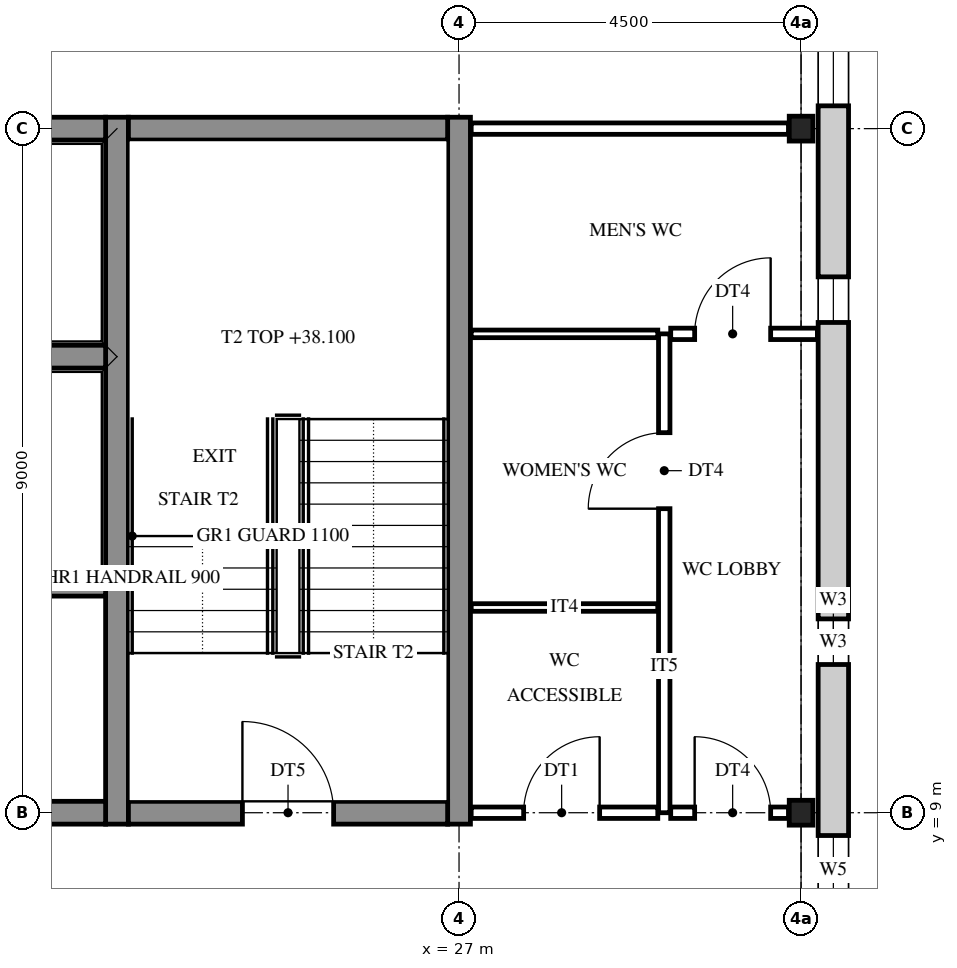
"""IFC4 building model, lengths in metres.
Left out: names, types, materials, properties, quantities, classifications, styles, units other than length and angle.
Written with IfcOpenShell. Run it as: python <this file> out.ifc"""

import sys

from ifc_helpers import new_model, si_unit, direction, frame, frame_2d, origin, origin_2d, place, context, subcontext, project, spatial, rectangle, i_section, extrude, element, fill, save


model = new_model("IFC4")
c1 = context("Model", 3, precision=1e-05, world=origin(), true_north=direction((0.0, 1.0)))
c2 = subcontext(c1, "Body", "Model", "MODEL_VIEW")
j1 = project(units=[si_unit("LENGTHUNIT", "METRE"), si_unit("PLANEANGLEUNIT", "RADIAN")], contexts=[c1])
p1 = place(None, origin())
s1 = spatial("IfcSite", under=j1, at=p1, CompositionType="ELEMENT")
p2 = place(p1, origin())
s2 = spatial("IfcBuilding", under=s1, at=p2, CompositionType="ELEMENT")
p3 = place(p2, frame((0.0, 0.0, 36.0)))
s3 = spatial("IfcBuildingStorey", under=s2, at=p3, CompositionType="ELEMENT", Elevation=36.0)
for number, where, z_axis, x_axis in (
    (1, (31.5, 9.0, 0.0), (0.0, 0.0, 1.0), (1.0, 0.0, 0.0)),
    (2, (31.5, 18.0, 0.0), (0.0, 0.0, 1.0), (1.0, 0.0, 0.0)),
):
    element("IfcColumn", number, at=place(p3, frame(where, z_axis=z_axis, x_axis=x_axis)), inside=s3, PredefinedType="COLUMN", context=c2, shape_type="SweptSolid", body=[
        extrude(i_section(OverallWidth=0.311, OverallDepth=0.327, WebThickness=0.016, FlangeThickness=0.025, FilletRadius=0.017, at=origin_2d()), origin(), (0.0, 0.0, 1.0), 4.2),
    ])
for number, where, z_axis, x_axis in (
    (3, (22.5, 8.85, 0.0), (0.0, 0.0, 1.0), (0.0, 1.0, 0.0)),
    (4, (27.0, 8.85, 0.0), (0.0, 0.0, 1.0), (0.0, 1.0, 0.0)),
):
    element("IfcWall", number, at=place(p3, frame(where, z_axis=z_axis, x_axis=x_axis)), inside=s3, PredefinedType="SHEAR", context=c2, shape_type="SweptSolid", body=[
        extrude(rectangle(XDim=9.3, YDim=0.3, at=frame_2d((4.65, 0.0))), origin(), (0.0, 0.0, 1.0), 4.2),
    ])
p4 = place(p3, frame((19.65, 9.0, 0.0), z_axis=(0.0, 0.0, 1.0), x_axis=(1.0, 0.0, 0.0)))
e5 = element("IfcWall", 5, at=p4, inside=s3, PredefinedType="SHEAR", context=c2, shape_type="SweptSolid", body=[
    extrude(rectangle(XDim=2.7, YDim=0.3, at=frame_2d((1.35, 0.0))), origin(), (0.0, 0.0, 1.0), 4.2),
])
p5 = place(p3, frame((22.65, 9.0, 0.0), z_axis=(0.0, 0.0, 1.0), x_axis=(1.0, 0.0, 0.0)))
e6 = element("IfcWall", 6, at=p5, inside=s3, PredefinedType="SHEAR", context=c2, shape_type="SweptSolid", body=[
    extrude(rectangle(XDim=4.2, YDim=0.3, at=frame_2d((2.1, 0.0))), origin(), (0.0, 0.0, 1.0), 4.2),
])
p6 = place(p5, frame((1.5, 0.0, 0.0)))
e7 = element("IfcOpeningElement", 7, at=p6, cuts=e6, PredefinedType="OPENING", context=c2, shape_type="SweptSolid", body=[
    extrude(rectangle(XDim=1.2, YDim=2.1, at=frame_2d((0.6, 1.05))), frame((0.0, 0.16, 0.0), z_axis=(0.0, -1.0, 0.0), x_axis=(1.0, 0.0, 0.0)), (0.0, 0.0, 1.0), 0.32),
])
for number, where, z_axis, x_axis in (
    (8, (19.65, 12.0, 0.0), (0.0, 0.0, 1.0), (1.0, 0.0, 0.0)),
    (9, (19.65, 15.0, 0.0), (0.0, 0.0, 1.0), (1.0, 0.0, 0.0)),
    (10, (19.65, 18.0, 0.0), (0.0, 0.0, 1.0), (1.0, 0.0, 0.0)),
):
    element("IfcWall", number, at=place(p3, frame(where, z_axis=z_axis, x_axis=x_axis)), inside=s3, PredefinedType="SHEAR", context=c2, shape_type="SweptSolid", body=[
        extrude(rectangle(XDim=2.7, YDim=0.3, at=frame_2d((1.35, 0.0))), origin(), (0.0, 0.0, 1.0), 4.2),
    ])
p7 = place(p3, frame((22.65, 18.0, 0.0), z_axis=(0.0, 0.0, 1.0), x_axis=(1.0, 0.0, 0.0)))
e11 = element("IfcWall", 11, at=p7, inside=s3, PredefinedType="SHEAR", context=c2, shape_type="SweptSolid", body=[
    extrude(rectangle(XDim=4.2, YDim=0.3, at=frame_2d((2.1, 0.0))), origin(), (0.0, 0.0, 1.0), 4.2),
])
p8 = place(p3, frame((31.925, 27.225, 0.0), z_axis=(0.0, 0.0, 1.0), x_axis=(0.0, -1.0, 0.0)))
e12 = element("IfcWall", 12, at=p8, inside=s3, PredefinedType="STANDARD", context=c2, shape_type="SweptSolid", body=[
    extrude(rectangle(XDim=27.45, YDim=0.4, at=frame_2d((13.725, 0.0))), origin(), (0.0, 0.0, 1.0), 4.2),
])
p9 = place(p8, frame((26.025, 0.0, 0.9)))
e13 = element("IfcOpeningElement", 13, at=p9, cuts=e12, PredefinedType="OPENING", context=c2, shape_type="SweptSolid", body=[
    extrude(rectangle(XDim=0.9, YDim=2.0, at=frame_2d((0.45, 1.0))), frame((0.0, 0.21, 0.0), z_axis=(0.0, -1.0, 0.0), x_axis=(1.0, 0.0, 0.0)), (0.0, 0.0, 1.0), 0.42),
])
p10 = place(p8, frame((18.525, 0.0, 0.9)))
e14 = element("IfcOpeningElement", 14, at=p10, cuts=e12, PredefinedType="OPENING", context=c2, shape_type="SweptSolid", body=[
    extrude(rectangle(XDim=0.9, YDim=2.0, at=frame_2d((0.45, 1.0))), frame((0.0, 0.21, 0.0), z_axis=(0.0, -1.0, 0.0), x_axis=(1.0, 0.0, 0.0)), (0.0, 0.0, 1.0), 0.42),
])
p11 = place(p8, frame((15.675, 0.0, 1.6)))
e15 = element("IfcOpeningElement", 15, at=p11, cuts=e12, PredefinedType="OPENING", context=c2, shape_type="SweptSolid", body=[
    extrude(rectangle(XDim=0.6, YDim=0.9, at=frame_2d((0.3, 0.45))), frame((0.0, 0.21, 0.0), z_axis=(0.0, -1.0, 0.0), x_axis=(1.0, 0.0, 0.0)), (0.0, 0.0, 1.0), 0.42),
])
p12 = place(p8, frame((11.175, 0.0, 1.6)))
e16 = element("IfcOpeningElement", 16, at=p12, cuts=e12, PredefinedType="OPENING", context=c2, shape_type="SweptSolid", body=[
    extrude(rectangle(XDim=0.6, YDim=0.9, at=frame_2d((0.3, 0.45))), frame((0.0, 0.21, 0.0), z_axis=(0.0, -1.0, 0.0), x_axis=(1.0, 0.0, 0.0)), (0.0, 0.0, 1.0), 0.42),
])
p13 = place(p8, frame((8.025, 0.0, 0.9)))
e17 = element("IfcOpeningElement", 17, at=p13, cuts=e12, PredefinedType="OPENING", context=c2, shape_type="SweptSolid", body=[
    extrude(rectangle(XDim=0.9, YDim=2.0, at=frame_2d((0.45, 1.0))), frame((0.0, 0.21, 0.0), z_axis=(0.0, -1.0, 0.0), x_axis=(1.0, 0.0, 0.0)), (0.0, 0.0, 1.0), 0.42),
])
p14 = place(p8, frame((0.525, 0.0, 0.9)))
e18 = element("IfcOpeningElement", 18, at=p14, cuts=e12, PredefinedType="OPENING", context=c2, shape_type="SweptSolid", body=[
    extrude(rectangle(XDim=0.9, YDim=2.0, at=frame_2d((0.45, 1.0))), frame((0.0, 0.21, 0.0), z_axis=(0.0, -1.0, 0.0), x_axis=(1.0, 0.0, 0.0)), (0.0, 0.0, 1.0), 0.42),
])
p15 = place(p3, frame((29.7, 9.0, 0.0), z_axis=(0.0, 0.0, 1.0), x_axis=(0.0, 1.0, 0.0)))
e19 = element("IfcWall", 19, at=p15, inside=s3, PredefinedType="PARTITIONING", context=c2, shape_type="SweptSolid", body=[
    extrude(rectangle(XDim=6.3, YDim=0.15, at=frame_2d((3.15, 0.0))), origin(), (0.0, 0.0, 1.0), 3.537),
])
p16 = place(p15, frame((4.0, 0.0, 0.0)))
e20 = element("IfcOpeningElement", 20, at=p16, cuts=e19, PredefinedType="OPENING", context=c2, shape_type="SweptSolid", body=[
    extrude(rectangle(XDim=1.0, YDim=2.1, at=frame_2d((0.5, 1.05))), frame((0.0, 0.085, 0.0), z_axis=(0.0, -1.0, 0.0), x_axis=(1.0, 0.0, 0.0)), (0.0, 0.0, 1.0), 0.17),
])
p17 = place(p3, frame((27.16, 9.0, 0.0), z_axis=(0.0, 0.0, 1.0), x_axis=(1.0, 0.0, 0.0)))
e21 = element("IfcWall", 21, at=p17, inside=s3, PredefinedType="PARTITIONING", context=c2, shape_type="SweptSolid", body=[
    extrude(rectangle(XDim=2.455, YDim=0.15, at=frame_2d((1.228, 0.0))), origin(), (0.0, 0.0, 1.0), 3.537),
])
p18 = place(p17, frame((0.69, 0.0, 0.0)))
e22 = element("IfcOpeningElement", 22, at=p18, cuts=e21, PredefinedType="OPENING", context=c2, shape_type="SweptSolid", body=[
    extrude(rectangle(XDim=1.0, YDim=2.1, at=frame_2d((0.5, 1.05))), frame((0.0, 0.085, 0.0), z_axis=(0.0, -1.0, 0.0), x_axis=(1.0, 0.0, 0.0)), (0.0, 0.0, 1.0), 0.17),
])
p19 = place(p3, frame((29.785, 9.0, 0.0), z_axis=(0.0, 0.0, 1.0), x_axis=(1.0, 0.0, 0.0)))
e23 = element("IfcWall", 23, at=p19, inside=s3, PredefinedType="PARTITIONING", context=c2, shape_type="SweptSolid", body=[
    extrude(rectangle(XDim=1.55, YDim=0.15, at=frame_2d((0.775, 0.0))), origin(), (0.0, 0.0, 1.0), 3.537),
])
p20 = place(p19, frame((0.315, 0.0, 0.0)))
e24 = element("IfcOpeningElement", 24, at=p20, cuts=e23, PredefinedType="OPENING", context=c2, shape_type="SweptSolid", body=[
    extrude(rectangle(XDim=1.0, YDim=2.1, at=frame_2d((0.5, 1.05))), frame((0.0, 0.085, 0.0), z_axis=(0.0, -1.0, 0.0), x_axis=(1.0, 0.0, 0.0)), (0.0, 0.0, 1.0), 0.17),
])
for number, where, z_axis, x_axis in (
    (25, (27.16, 11.7, 0.0), (0.0, 0.0, 1.0), (1.0, 0.0, 0.0)),
    (26, (27.16, 15.3, 0.0), (0.0, 0.0, 1.0), (1.0, 0.0, 0.0)),
):
    element("IfcWall", number, at=place(p3, frame(where, z_axis=z_axis, x_axis=x_axis)), inside=s3, PredefinedType="PARTITIONING", context=c2, shape_type="SweptSolid", body=[
        extrude(rectangle(XDim=2.455, YDim=0.1, at=frame_2d((1.228, 0.0))), origin(), (0.0, 0.0, 1.0), 3.537),
    ])
p21 = place(p3, frame((29.785, 15.3, 0.0), z_axis=(0.0, 0.0, 1.0), x_axis=(1.0, 0.0, 0.0)))
e27 = element("IfcWall", 27, at=p21, inside=s3, PredefinedType="PARTITIONING", context=c2, shape_type="SweptSolid", body=[
    extrude(rectangle(XDim=1.93, YDim=0.15, at=frame_2d((0.965, 0.0))), origin(), (0.0, 0.0, 1.0), 3.537),
])
p22 = place(p21, frame((0.315, 0.0, 0.0)))
e28 = element("IfcOpeningElement", 28, at=p22, cuts=e27, PredefinedType="OPENING", context=c2, shape_type="SweptSolid", body=[
    extrude(rectangle(XDim=1.0, YDim=2.1, at=frame_2d((0.5, 1.05))), frame((0.0, 0.085, 0.0), z_axis=(0.0, -1.0, 0.0), x_axis=(1.0, 0.0, 0.0)), (0.0, 0.0, 1.0), 0.17),
])
p23 = place(p3, frame((27.16, 18.0, 0.0), z_axis=(0.0, 0.0, 1.0), x_axis=(1.0, 0.0, 0.0)))
e29 = element("IfcWall", 29, at=p23, inside=s3, PredefinedType="PARTITIONING", context=c2, shape_type="SweptSolid", body=[
    extrude(rectangle(XDim=4.175, YDim=0.15, at=frame_2d((2.087, 0.0))), origin(), (0.0, 0.0, 1.0), 3.537),
])
p24 = place(p10, origin())
e30 = element("IfcWindow", 30, at=p24, inside=s3, PartitioningType="SINGLE_PANEL", PredefinedType="WINDOW", context=c2, shape_type="SweptSolid", body=[
    extrude(rectangle(XDim=0.9, YDim=2.0, at=frame_2d((0.45, 1.0))), frame((0.0, 0.03, 0.0), z_axis=(0.0, -1.0, 0.0), x_axis=(1.0, 0.0, 0.0)), (0.0, 0.0, 1.0), 0.06),
])
fill(e14, e30)
p25 = place(p11, origin())
e31 = element("IfcWindow", 31, at=p25, inside=s3, PartitioningType="SINGLE_PANEL", PredefinedType="WINDOW", context=c2, shape_type="SweptSolid", body=[
    extrude(rectangle(XDim=0.6, YDim=0.9, at=frame_2d((0.3, 0.45))), frame((0.0, 0.03, 0.0), z_axis=(0.0, -1.0, 0.0), x_axis=(1.0, 0.0, 0.0)), (0.0, 0.0, 1.0), 0.06),
])
fill(e15, e31)
p26 = place(p12, origin())
e32 = element("IfcWindow", 32, at=p26, inside=s3, PartitioningType="SINGLE_PANEL", PredefinedType="WINDOW", context=c2, shape_type="SweptSolid", body=[
    extrude(rectangle(XDim=0.6, YDim=0.9, at=frame_2d((0.3, 0.45))), frame((0.0, 0.03, 0.0), z_axis=(0.0, -1.0, 0.0), x_axis=(1.0, 0.0, 0.0)), (0.0, 0.0, 1.0), 0.06),
])
fill(e16, e32)
p27 = place(p13, origin())
e33 = element("IfcWindow", 33, at=p27, inside=s3, PartitioningType="SINGLE_PANEL", PredefinedType="WINDOW", context=c2, shape_type="SweptSolid", body=[
    extrude(rectangle(XDim=0.9, YDim=2.0, at=frame_2d((0.45, 1.0))), frame((0.0, 0.03, 0.0), z_axis=(0.0, -1.0, 0.0), x_axis=(1.0, 0.0, 0.0)), (0.0, 0.0, 1.0), 0.06),
])
fill(e17, e33)
p28 = place(p6, origin())
e34 = element("IfcDoor", 34, at=p28, inside=s3, OperationType="SINGLE_SWING_LEFT", PredefinedType="DOOR", context=c2, shape_type="SweptSolid", body=[
    extrude(rectangle(XDim=1.2, YDim=2.1, at=frame_2d((0.6, 1.05))), frame((0.0, 0.025, 0.0), z_axis=(0.0, -1.0, 0.0), x_axis=(1.0, 0.0, 0.0)), (0.0, 0.0, 1.0), 0.05),
])
fill(e7, e34)
p29 = place(p18, origin())
e35 = element("IfcDoor", 35, at=p29, inside=s3, OperationType="SINGLE_SWING_RIGHT", PredefinedType="DOOR", context=c2, shape_type="SweptSolid", body=[
    extrude(rectangle(XDim=1.0, YDim=2.1, at=frame_2d((0.5, 1.05))), frame((0.0, 0.025, 0.0), z_axis=(0.0, -1.0, 0.0), x_axis=(1.0, 0.0, 0.0)), (0.0, 0.0, 1.0), 0.05),
])
fill(e22, e35)
p30 = place(p16, origin())
e36 = element("IfcDoor", 36, at=p30, inside=s3, OperationType="SINGLE_SWING_LEFT", PredefinedType="DOOR", context=c2, shape_type="SweptSolid", body=[
    extrude(rectangle(XDim=1.0, YDim=2.1, at=frame_2d((0.5, 1.05))), frame((0.0, 0.025, 0.0), z_axis=(0.0, -1.0, 0.0), x_axis=(1.0, 0.0, 0.0)), (0.0, 0.0, 1.0), 0.05),
])
fill(e20, e36)
p31 = place(p22, origin())
e37 = element("IfcDoor", 37, at=p31, inside=s3, OperationType="SINGLE_SWING_RIGHT", PredefinedType="DOOR", context=c2, shape_type="SweptSolid", body=[
    extrude(rectangle(XDim=1.0, YDim=2.1, at=frame_2d((0.5, 1.05))), frame((0.0, 0.025, 0.0), z_axis=(0.0, -1.0, 0.0), x_axis=(1.0, 0.0, 0.0)), (0.0, 0.0, 1.0), 0.05),
])
fill(e28, e37)
p32 = place(p20, origin())
e38 = element("IfcDoor", 38, at=p32, inside=s3, OperationType="SINGLE_SWING_LEFT", PredefinedType="DOOR", context=c2, shape_type="SweptSolid", body=[
    extrude(rectangle(XDim=1.0, YDim=2.1, at=frame_2d((0.5, 1.05))), frame((0.0, 0.025, 0.0), z_axis=(0.0, -1.0, 0.0), x_axis=(1.0, 0.0, 0.0)), (0.0, 0.0, 1.0), 0.05),
])
fill(e24, e38)
save(model, sys.argv[1])
